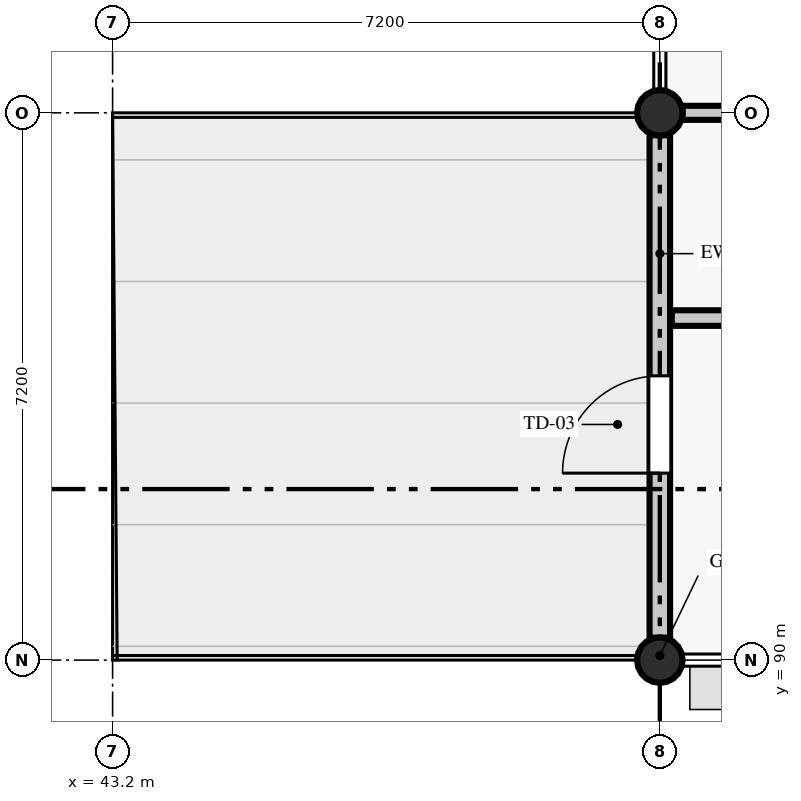
"""IFC4 building model, lengths in metres.
Left out: names, types, materials, properties, quantities, classifications, styles, units other than length and angle.
Written with IfcOpenShell. Run it as: python <this file> out.ifc"""

import sys

from ifc_helpers import new_model, si_unit, direction, frame, frame_2d, origin, origin_2d, place, context, subcontext, project, spatial, rectangle, circle, extrude, element, fill, save


model = new_model("IFC4")
c1 = context("Model", 3, precision=1e-05, world=origin(), true_north=direction((0.0, 1.0)))
c2 = subcontext(c1, "Body", "Model", "MODEL_VIEW")
j1 = project(units=[si_unit("LENGTHUNIT", "METRE"), si_unit("PLANEANGLEUNIT", "RADIAN")], contexts=[c1])
p1 = place(None, origin())
s1 = spatial("IfcSite", under=j1, at=p1, CompositionType="ELEMENT")
p2 = place(p1, origin())
s2 = spatial("IfcBuilding", under=s1, at=p2, CompositionType="ELEMENT")
p3 = place(p2, frame((0.0, 0.0, 13.8)))
s3 = spatial("IfcBuildingStorey", under=s2, at=p3, CompositionType="ELEMENT", Elevation=13.8)
for number, where, z_axis, x_axis in (
    (1, (50.4, 90.0, 0.0), (0.0, 0.0, 1.0), (1.0, 0.0, 0.0)),
    (2, (50.4, 97.2, 0.0), (0.0, 0.0, 1.0), (1.0, 0.0, 0.0)),
):
    element("IfcColumn", number, at=place(p3, frame(where, z_axis=z_axis, x_axis=x_axis)), inside=s3, PredefinedType="COLUMN", context=c2, shape_type="SweptSolid", body=[
        extrude(circle(Radius=0.3, at=origin_2d()), origin(), (0.0, 0.0, 1.0), 3.945),
    ])
p4 = place(p3, frame((50.4, 96.905, 0.0), z_axis=(0.0, 0.0, 1.0), x_axis=(0.0, -1.0, 0.0)))
e3 = element("IfcWall", 3, at=p4, inside=s3, PredefinedType="STANDARD", context=c2, shape_type="SweptSolid", body=[
    extrude(rectangle(XDim=6.61, YDim=0.27, at=frame_2d((3.305, 0.0))), origin(), (0.0, 0.0, 1.0), 3.295),
])
p5 = place(p4, frame((3.165, 0.0, 0.0)))
e4 = element("IfcOpeningElement", 4, at=p5, cuts=e3, PredefinedType="OPENING", context=c2, shape_type="SweptSolid", body=[
    extrude(rectangle(XDim=1.28, YDim=2.15, at=frame_2d((0.64, 1.075))), frame((0.0, 0.145, 0.0), z_axis=(0.0, -1.0, 0.0), x_axis=(1.0, 0.0, 0.0)), (0.0, 0.0, 1.0), 0.29),
])
p6 = place(p3, frame((50.7, 97.2, 0.0), z_axis=(0.0, 0.0, 1.0), x_axis=(1.0, 0.0, 0.0)))
e5 = element("IfcWall", 5, at=p6, inside=s3, PredefinedType="PARTITIONING", context=c2, shape_type="SweptSolid", body=[
    extrude(rectangle(XDim=35.4, YDim=0.185, at=frame_2d((17.7, 0.0))), origin(), (0.0, 0.0, 1.0), 3.195),
])
p7 = place(p6, frame((3.124, 0.0, 0.0)))
e6 = element("IfcOpeningElement", 6, at=p7, cuts=e5, PredefinedType="OPENING", context=c2, shape_type="SweptSolid", body=[
    extrude(rectangle(XDim=0.9, YDim=2.13, at=frame_2d((0.45, 1.065))), frame((0.0, 0.103, 0.0), z_axis=(0.0, -1.0, 0.0), x_axis=(1.0, 0.0, 0.0)), (0.0, 0.0, 1.0), 0.205),
])
p8 = place(p6, frame((8.686, 0.0, 0.0)))
e7 = element("IfcOpeningElement", 7, at=p8, cuts=e5, PredefinedType="OPENING", context=c2, shape_type="SweptSolid", body=[
    extrude(rectangle(XDim=0.95, YDim=2.13, at=frame_2d((0.475, 1.065))), frame((0.0, 0.103, 0.0), z_axis=(0.0, -1.0, 0.0), x_axis=(1.0, 0.0, 0.0)), (0.0, 0.0, 1.0), 0.205),
])
p9 = place(p6, frame((10.341, 0.0, 0.0)))
e8 = element("IfcOpeningElement", 8, at=p9, cuts=e5, PredefinedType="OPENING", context=c2, shape_type="SweptSolid", body=[
    extrude(rectangle(XDim=1.0, YDim=2.13, at=frame_2d((0.5, 1.065))), frame((0.0, 0.103, 0.0), z_axis=(0.0, -1.0, 0.0), x_axis=(1.0, 0.0, 0.0)), (0.0, 0.0, 1.0), 0.205),
])
p10 = place(p6, frame((17.153, 0.0, 0.0)))
e9 = element("IfcOpeningElement", 9, at=p10, cuts=e5, PredefinedType="OPENING", context=c2, shape_type="SweptSolid", body=[
    extrude(rectangle(XDim=1.05, YDim=2.13, at=frame_2d((0.525, 1.065))), frame((0.0, 0.103, 0.0), z_axis=(0.0, -1.0, 0.0), x_axis=(1.0, 0.0, 0.0)), (0.0, 0.0, 1.0), 0.205),
])
p11 = place(p6, frame((22.28, 0.0, 0.0)))
e10 = element("IfcOpeningElement", 10, at=p11, cuts=e5, PredefinedType="OPENING", context=c2, shape_type="SweptSolid", body=[
    extrude(rectangle(XDim=0.92, YDim=2.18, at=frame_2d((0.46, 1.09))), frame((0.0, 0.103, 0.0), z_axis=(0.0, -1.0, 0.0), x_axis=(1.0, 0.0, 0.0)), (0.0, 0.0, 1.0), 0.205),
])
p12 = place(p6, frame((24.48, 0.0, 0.0)))
e11 = element("IfcOpeningElement", 11, at=p12, cuts=e5, PredefinedType="OPENING", context=c2, shape_type="SweptSolid", body=[
    extrude(rectangle(XDim=0.94, YDim=2.08, at=frame_2d((0.47, 1.04))), frame((0.0, 0.103, 0.0), z_axis=(0.0, -1.0, 0.0), x_axis=(1.0, 0.0, 0.0)), (0.0, 0.0, 1.0), 0.205),
])
p13 = place(p6, frame((26.77, 0.0, 0.0)))
e12 = element("IfcOpeningElement", 12, at=p13, cuts=e5, PredefinedType="OPENING", context=c2, shape_type="SweptSolid", body=[
    extrude(rectangle(XDim=0.9, YDim=2.08, at=frame_2d((0.45, 1.04))), frame((0.0, 0.103, 0.0), z_axis=(0.0, -1.0, 0.0), x_axis=(1.0, 0.0, 0.0)), (0.0, 0.0, 1.0), 0.205),
])
p14 = place(p6, frame((31.573, 0.0, 0.0)))
e13 = element("IfcOpeningElement", 13, at=p14, cuts=e5, PredefinedType="OPENING", context=c2, shape_type="SweptSolid", body=[
    extrude(rectangle(XDim=0.97, YDim=2.18, at=frame_2d((0.485, 1.09))), frame((0.0, 0.103, 0.0), z_axis=(0.0, -1.0, 0.0), x_axis=(1.0, 0.0, 0.0)), (0.0, 0.0, 1.0), 0.205),
])
p15 = place(p3, frame((50.557, 94.5, 0.0), z_axis=(0.0, 0.0, 1.0), x_axis=(1.0, 0.0, 0.0)))
e14 = element("IfcWall", 14, at=p15, inside=s3, PredefinedType="PARTITIONING", context=c2, shape_type="SweptSolid", body=[
    extrude(rectangle(XDim=7.023, YDim=0.205, at=frame_2d((3.512, 0.0))), origin(), (0.0, 0.0, 1.0), 3.945),
])
p16 = place(p15, frame((2.96, 0.0, 0.0)))
e15 = element("IfcOpeningElement", 15, at=p16, cuts=e14, PredefinedType="OPENING", context=c2, shape_type="SweptSolid", body=[
    extrude(rectangle(XDim=1.03, YDim=2.18, at=frame_2d((0.515, 1.09))), frame((0.0, 0.113, 0.0), z_axis=(0.0, -1.0, 0.0), x_axis=(1.0, 0.0, 0.0)), (0.0, 0.0, 1.0), 0.225),
])
p17 = place(p5, frame((1.28, 0.0, 0.0), z_axis=(0.0, 0.0, 1.0), x_axis=(-1.0, 0.0, 0.0)))
e16 = element("IfcDoor", 16, at=p17, inside=s3, OperationType="SINGLE_SWING_LEFT", PredefinedType="DOOR", context=c2, shape_type="SweptSolid", body=[
    extrude(rectangle(XDim=1.28, YDim=2.15, at=frame_2d((0.64, 1.075))), frame((0.0, 0.025, 0.0), z_axis=(0.0, -1.0, 0.0), x_axis=(1.0, 0.0, 0.0)), (0.0, 0.0, 1.0), 0.05),
])
fill(e4, e16)
save(model, sys.argv[1])
